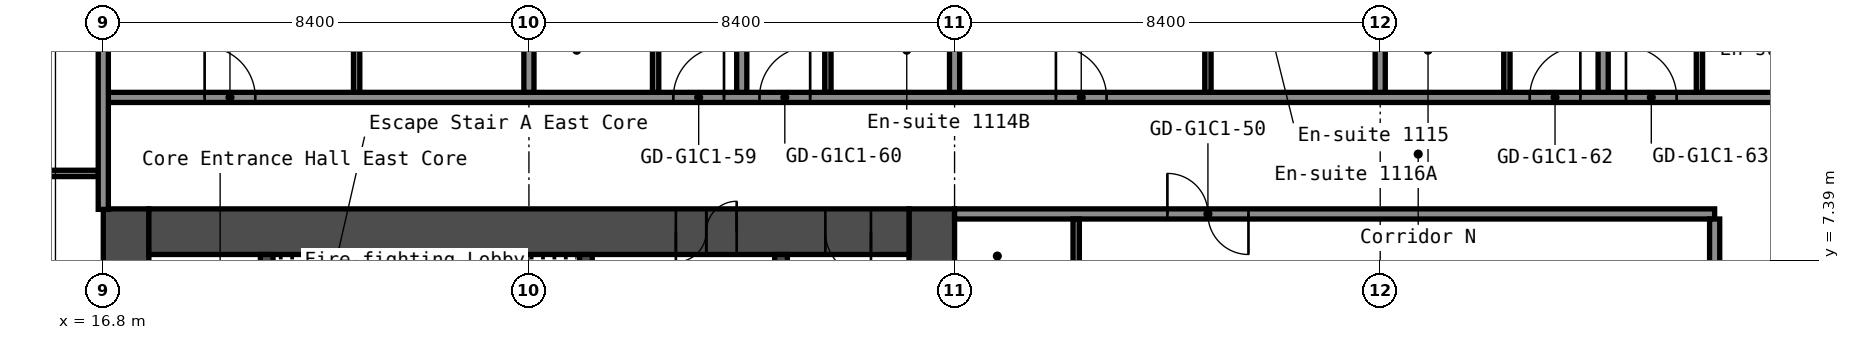
"""IFC4 building model, lengths in metres.
Left out: names, types, materials, properties, quantities, classifications, styles, units other than length and angle.
Written with IfcOpenShell. Run it as: python <this file> out.ifc"""

import sys

from ifc_helpers import new_model, si_unit, direction, frame, frame_2d, origin, place, context, subcontext, project, spatial, rectangle, extrude, element, fill, save


model = new_model("IFC4")
c1 = context("Model", 3, precision=1e-05, world=origin(), true_north=direction((0.0, 1.0)))
c2 = subcontext(c1, "Body", "Model", "MODEL_VIEW")
j1 = project(units=[si_unit("LENGTHUNIT", "METRE"), si_unit("PLANEANGLEUNIT", "RADIAN")], contexts=[c1])
p1 = place(None, origin())
s1 = spatial("IfcSite", under=j1, at=p1, CompositionType="ELEMENT")
p2 = place(p1, origin())
s2 = spatial("IfcBuilding", under=s1, at=p2, CompositionType="ELEMENT")
p3 = place(p2, frame((0.0, 0.0, 42.2)))
s3 = spatial("IfcBuildingStorey", under=s2, at=p3, CompositionType="ELEMENT", Elevation=42.2)
p4 = place(p3, frame((17.25, -8.4, 0.0), z_axis=(0.0, 0.0, 1.0), x_axis=(0.0, 1.0, 0.0)))
e1 = element("IfcWall", 1, at=p4, inside=s3, PredefinedType="SHEAR", context=c2, shape_type="SweptSolid", body=[
    extrude(rectangle(XDim=16.8, YDim=0.9, at=frame_2d((8.4, 0.0))), origin(), (0.0, 0.0, 1.0), 2.8),
])
p5 = place(p4, frame((12.75, 0.0, 0.0)))
e2 = element("IfcOpeningElement", 2, at=p5, cuts=e1, PredefinedType="OPENING", context=c2, shape_type="SweptSolid", body=[
    extrude(rectangle(XDim=1.2, YDim=2.1, at=frame_2d((0.6, 1.05))), frame((0.0, 0.46, 0.0), z_axis=(0.0, -1.0, 0.0), x_axis=(1.0, 0.0, 0.0)), (0.0, 0.0, 1.0), 0.92),
])
p6 = place(p4, frame((2.85, 0.0, 0.0)))
e3 = element("IfcOpeningElement", 3, at=p6, cuts=e1, PredefinedType="OPENING", context=c2, shape_type="SweptSolid", body=[
    extrude(rectangle(XDim=1.2, YDim=2.1, at=frame_2d((0.6, 1.05))), frame((0.0, 0.46, 0.0), z_axis=(0.0, -1.0, 0.0), x_axis=(1.0, 0.0, 0.0)), (0.0, 0.0, 1.0), 0.92),
])
p7 = place(p3, frame((33.15, -8.4, 0.0), z_axis=(0.0, 0.0, 1.0), x_axis=(0.0, 1.0, 0.0)))
e4 = element("IfcWall", 4, at=p7, inside=s3, PredefinedType="SHEAR", context=c2, shape_type="SweptSolid", body=[
    extrude(rectangle(XDim=16.8, YDim=0.9, at=frame_2d((8.4, 0.0))), origin(), (0.0, 0.0, 1.0), 2.8),
])
p8 = place(p3, frame((17.7, 7.95, 0.0), z_axis=(0.0, 0.0, 1.0), x_axis=(1.0, 0.0, 0.0)))
e5 = element("IfcWall", 5, at=p8, inside=s3, PredefinedType="SHEAR", context=c2, shape_type="SweptSolid", body=[
    extrude(rectangle(XDim=15.0, YDim=0.9, at=frame_2d((7.5, 0.0))), origin(), (0.0, 0.0, 1.0), 2.8),
])
p9 = place(p8, frame((10.4, 0.0, 0.0)))
e6 = element("IfcOpeningElement", 6, at=p9, cuts=e5, PredefinedType="OPENING", context=c2, shape_type="SweptSolid", body=[
    extrude(rectangle(XDim=1.2, YDim=2.1, at=frame_2d((0.6, 1.05))), frame((0.0, 0.46, 0.0), z_axis=(0.0, -1.0, 0.0), x_axis=(1.0, 0.0, 0.0)), (0.0, 0.0, 1.0), 0.92),
])
p10 = place(p8, frame((13.35, 0.0, 0.0)))
e7 = element("IfcOpeningElement", 7, at=p10, cuts=e5, PredefinedType="OPENING", context=c2, shape_type="SweptSolid", body=[
    extrude(rectangle(XDim=0.9, YDim=2.1, at=frame_2d((0.45, 1.05))), frame((0.0, 0.46, 0.0), z_axis=(0.0, -1.0, 0.0), x_axis=(1.0, 0.0, 0.0)), (0.0, 0.0, 1.0), 0.92),
])
p11 = place(p3, frame((20.025, 1.2, 0.0), z_axis=(0.0, 0.0, 1.0), x_axis=(0.0, 1.0, 0.0)))
e8 = element("IfcWall", 8, at=p11, inside=s3, PredefinedType="SHEAR", context=c2, shape_type="SweptSolid", body=[
    extrude(rectangle(XDim=6.3, YDim=0.25, at=frame_2d((3.15, 0.0))), origin(), (0.0, 0.0, 1.0), 2.8),
])
p12 = place(p3, frame((26.325, 3.75, 0.0), z_axis=(0.0, 0.0, 1.0), x_axis=(0.0, 1.0, 0.0)))
e9 = element("IfcWall", 9, at=p12, inside=s3, PredefinedType="SHEAR", context=c2, shape_type="SweptSolid", body=[
    extrude(rectangle(XDim=3.75, YDim=0.25, at=frame_2d((1.875, 0.0))), origin(), (0.0, 0.0, 1.0), 2.8),
])
p13 = place(p12, frame((1.25, 0.0, 0.0)))
e10 = element("IfcOpeningElement", 10, at=p13, cuts=e9, PredefinedType="OPENING", context=c2, shape_type="SweptSolid", body=[
    extrude(rectangle(XDim=1.2, YDim=2.1, at=frame_2d((0.6, 1.05))), frame((0.0, 0.135, 0.0), z_axis=(0.0, -1.0, 0.0), x_axis=(1.0, 0.0, 0.0)), (0.0, 0.0, 1.0), 0.27),
])
p14 = place(p3, frame((30.175, 1.45, 0.0), z_axis=(0.0, 0.0, 1.0), x_axis=(0.0, 1.0, 0.0)))
e11 = element("IfcWall", 11, at=p14, inside=s3, PredefinedType="SHEAR", context=c2, shape_type="SweptSolid", body=[
    extrude(rectangle(XDim=6.05, YDim=0.25, at=frame_2d((3.025, 0.0))), origin(), (0.0, 0.0, 1.0), 2.8),
])
p15 = place(p14, frame((2.625, 0.0, 0.0)))
e12 = element("IfcOpeningElement", 12, at=p15, cuts=e11, PredefinedType="OPENING", context=c2, shape_type="SweptSolid", body=[
    extrude(rectangle(XDim=1.1, YDim=2.1, at=frame_2d((0.55, 1.05))), frame((0.0, 0.135, 0.0), z_axis=(0.0, -1.0, 0.0), x_axis=(1.0, 0.0, 0.0)), (0.0, 0.0, 1.0), 0.27),
])
p16 = place(p3, frame((33.6, 8.3, 0.0), z_axis=(0.0, 0.0, 1.0), x_axis=(1.0, 0.0, 0.0)))
e13 = element("IfcWall", 13, at=p16, inside=s3, PredefinedType="PARTITIONING", context=c2, shape_type="SweptSolid", body=[
    extrude(rectangle(XDim=15.0, YDim=0.2, at=frame_2d((7.5, 0.0))), origin(), (0.0, 0.0, 1.0), 2.8),
])
p17 = place(p16, frame((4.2, 0.0, 0.0)))
e14 = element("IfcOpeningElement", 14, at=p17, cuts=e13, PredefinedType="OPENING", context=c2, shape_type="SweptSolid", body=[
    extrude(rectangle(XDim=1.6, YDim=2.1, at=frame_2d((0.8, 1.05))), frame((0.0, 0.11, 0.0), z_axis=(0.0, -1.0, 0.0), x_axis=(1.0, 0.0, 0.0)), (0.0, 0.0, 1.0), 0.22),
])
p18 = place(p3, frame((14.363, 9.1, 0.0), z_axis=(0.0, 0.0, 1.0), x_axis=(1.0, 0.0, 0.0)))
e15 = element("IfcWall", 15, at=p18, inside=s3, PredefinedType="PARTITIONING", context=c2, shape_type="SweptSolid", body=[
    extrude(rectangle(XDim=2.337, YDim=0.125, at=frame_2d((1.169, 0.0))), origin(), (0.0, 0.0, 1.0), 2.8),
])
p19 = place(p3, frame((16.8, 10.6, 0.0), z_axis=(0.0, 0.0, 1.0), x_axis=(1.0, 0.0, 0.0)))
e16 = element("IfcWall", 16, at=p19, inside=s3, PredefinedType="PARTITIONING", context=c2, shape_type="SweptSolid", body=[
    extrude(rectangle(XDim=34.3, YDim=0.2, at=frame_2d((17.15, 0.0))), origin(), (0.0, 0.0, 1.0), 2.8),
])
p20 = place(p19, frame((2.0, 0.0, 0.0)))
e17 = element("IfcOpeningElement", 17, at=p20, cuts=e16, PredefinedType="OPENING", context=c2, shape_type="SweptSolid", body=[
    extrude(rectangle(XDim=1.0, YDim=2.1, at=frame_2d((0.5, 1.05))), frame((0.0, 0.11, 0.0), z_axis=(0.0, -1.0, 0.0), x_axis=(1.0, 0.0, 0.0)), (0.0, 0.0, 1.0), 0.22),
])
p21 = place(p19, frame((11.25, 0.0, 0.0)))
e18 = element("IfcOpeningElement", 18, at=p21, cuts=e16, PredefinedType="OPENING", context=c2, shape_type="SweptSolid", body=[
    extrude(rectangle(XDim=1.0, YDim=2.1, at=frame_2d((0.5, 1.05))), frame((0.0, 0.11, 0.0), z_axis=(0.0, -1.0, 0.0), x_axis=(1.0, 0.0, 0.0)), (0.0, 0.0, 1.0), 0.22),
])
p22 = place(p19, frame((12.95, 0.0, 0.0)))
e19 = element("IfcOpeningElement", 19, at=p22, cuts=e16, PredefinedType="OPENING", context=c2, shape_type="SweptSolid", body=[
    extrude(rectangle(XDim=1.0, YDim=2.1, at=frame_2d((0.5, 1.05))), frame((0.0, 0.11, 0.0), z_axis=(0.0, -1.0, 0.0), x_axis=(1.0, 0.0, 0.0)), (0.0, 0.0, 1.0), 0.22),
])
p23 = place(p19, frame((18.8, 0.0, 0.0)))
e20 = element("IfcOpeningElement", 20, at=p23, cuts=e16, PredefinedType="OPENING", context=c2, shape_type="SweptSolid", body=[
    extrude(rectangle(XDim=1.0, YDim=2.1, at=frame_2d((0.5, 1.05))), frame((0.0, 0.11, 0.0), z_axis=(0.0, -1.0, 0.0), x_axis=(1.0, 0.0, 0.0)), (0.0, 0.0, 1.0), 0.22),
])
p24 = place(p19, frame((28.15, 0.0, 0.0)))
e21 = element("IfcOpeningElement", 21, at=p24, cuts=e16, PredefinedType="OPENING", context=c2, shape_type="SweptSolid", body=[
    extrude(rectangle(XDim=1.0, YDim=2.1, at=frame_2d((0.5, 1.05))), frame((0.0, 0.11, 0.0), z_axis=(0.0, -1.0, 0.0), x_axis=(1.0, 0.0, 0.0)), (0.0, 0.0, 1.0), 0.22),
])
p25 = place(p19, frame((30.05, 0.0, 0.0)))
e22 = element("IfcOpeningElement", 22, at=p25, cuts=e16, PredefinedType="OPENING", context=c2, shape_type="SweptSolid", body=[
    extrude(rectangle(XDim=1.0, YDim=2.1, at=frame_2d((0.5, 1.05))), frame((0.0, 0.11, 0.0), z_axis=(0.0, -1.0, 0.0), x_axis=(1.0, 0.0, 0.0)), (0.0, 0.0, 1.0), 0.22),
])
p26 = place(p3, frame((16.8, 8.39, 0.0), z_axis=(0.0, 0.0, 1.0), x_axis=(0.0, 1.0, 0.0)))
e23 = element("IfcWall", 23, at=p26, inside=s3, PredefinedType="PARTITIONING", context=c2, shape_type="SweptSolid", body=[
    extrude(rectangle(XDim=11.91, YDim=0.2, at=frame_2d((5.955, 0.0))), origin(), (0.0, 0.0, 1.0), 2.8),
])
p27 = place(p3, frame((21.8, 10.7, 0.0), z_axis=(0.0, 0.0, 1.0), x_axis=(0.0, 1.0, 0.0)))
e24 = element("IfcWall", 24, at=p27, inside=s3, PredefinedType="PARTITIONING", context=c2, shape_type="SweptSolid", body=[
    extrude(rectangle(XDim=3.3, YDim=0.125, at=frame_2d((1.65, 0.0))), origin(), (0.0, 0.0, 1.0), 2.8),
])
p28 = place(p3, frame((25.2, 10.7, 0.0), z_axis=(0.0, 0.0, 1.0), x_axis=(0.0, 1.0, 0.0)))
e25 = element("IfcWall", 25, at=p28, inside=s3, PredefinedType="PARTITIONING", context=c2, shape_type="SweptSolid", body=[
    extrude(rectangle(XDim=9.6, YDim=0.2, at=frame_2d((4.8, 0.0))), origin(), (0.0, 0.0, 1.0), 2.8),
])
p29 = place(p3, frame((27.7, 10.7, 0.0), z_axis=(0.0, 0.0, 1.0), x_axis=(0.0, 1.0, 0.0)))
e26 = element("IfcWall", 26, at=p29, inside=s3, PredefinedType="PARTITIONING", context=c2, shape_type="SweptSolid", body=[
    extrude(rectangle(XDim=2.9, YDim=0.125, at=frame_2d((1.45, 0.0))), origin(), (0.0, 0.0, 1.0), 2.8),
])
p30 = place(p29, frame((1.5, 0.0, 0.0)))
e27 = element("IfcOpeningElement", 27, at=p30, cuts=e26, PredefinedType="OPENING", context=c2, shape_type="SweptSolid", body=[
    extrude(rectangle(XDim=0.8, YDim=2.1, at=frame_2d((0.4, 1.05))), frame((0.0, 0.073, 0.0), z_axis=(0.0, -1.0, 0.0), x_axis=(1.0, 0.0, 0.0)), (0.0, 0.0, 1.0), 0.145),
])
p31 = place(p3, frame((29.4, 10.7, 0.0), z_axis=(0.0, 0.0, 1.0), x_axis=(0.0, 1.0, 0.0)))
e28 = element("IfcWall", 28, at=p31, inside=s3, PredefinedType="PARTITIONING", context=c2, shape_type="SweptSolid", body=[
    extrude(rectangle(XDim=9.6, YDim=0.2, at=frame_2d((4.8, 0.0))), origin(), (0.0, 0.0, 1.0), 2.8),
])
p32 = place(p3, frame((31.1, 10.7, 0.0), z_axis=(0.0, 0.0, 1.0), x_axis=(0.0, 1.0, 0.0)))
e29 = element("IfcWall", 29, at=p32, inside=s3, PredefinedType="PARTITIONING", context=c2, shape_type="SweptSolid", body=[
    extrude(rectangle(XDim=2.9, YDim=0.125, at=frame_2d((1.45, 0.0))), origin(), (0.0, 0.0, 1.0), 2.8),
])
p33 = place(p32, frame((1.5, 0.0, 0.0)))
e30 = element("IfcOpeningElement", 30, at=p33, cuts=e29, PredefinedType="OPENING", context=c2, shape_type="SweptSolid", body=[
    extrude(rectangle(XDim=0.8, YDim=2.1, at=frame_2d((0.4, 1.05))), frame((0.0, 0.073, 0.0), z_axis=(0.0, -1.0, 0.0), x_axis=(1.0, 0.0, 0.0)), (0.0, 0.0, 1.0), 0.145),
])
p34 = place(p3, frame((33.6, 10.7, 0.0), z_axis=(0.0, 0.0, 1.0), x_axis=(0.0, 1.0, 0.0)))
e31 = element("IfcWall", 31, at=p34, inside=s3, PredefinedType="PARTITIONING", context=c2, shape_type="SweptSolid", body=[
    extrude(rectangle(XDim=9.6, YDim=0.2, at=frame_2d((4.8, 0.0))), origin(), (0.0, 0.0, 1.0), 2.8),
])
p35 = place(p3, frame((36.0, 5.7, 0.0), z_axis=(0.0, 0.0, 1.0), x_axis=(0.0, 1.0, 0.0)))
e32 = element("IfcWall", 32, at=p35, inside=s3, PredefinedType="PARTITIONING", context=c2, shape_type="SweptSolid", body=[
    extrude(rectangle(XDim=2.5, YDim=0.125, at=frame_2d((1.25, 0.0))), origin(), (0.0, 0.0, 1.0), 2.8),
])
p36 = place(p35, frame((0.55, 0.0, 0.0)))
e33 = element("IfcOpeningElement", 33, at=p36, cuts=e32, PredefinedType="OPENING", context=c2, shape_type="SweptSolid", body=[
    extrude(rectangle(XDim=0.9, YDim=2.1, at=frame_2d((0.45, 1.05))), frame((0.0, 0.073, 0.0), z_axis=(0.0, -1.0, 0.0), x_axis=(1.0, 0.0, 0.0)), (0.0, 0.0, 1.0), 0.145),
])
p37 = place(p3, frame((38.6, 10.7, 0.0), z_axis=(0.0, 0.0, 1.0), x_axis=(0.0, 1.0, 0.0)))
e34 = element("IfcWall", 34, at=p37, inside=s3, PredefinedType="PARTITIONING", context=c2, shape_type="SweptSolid", body=[
    extrude(rectangle(XDim=3.3, YDim=0.125, at=frame_2d((1.65, 0.0))), origin(), (0.0, 0.0, 1.0), 2.8),
])
p38 = place(p3, frame((42.0, 10.7, 0.0), z_axis=(0.0, 0.0, 1.0), x_axis=(0.0, 1.0, 0.0)))
e35 = element("IfcWall", 35, at=p38, inside=s3, PredefinedType="PARTITIONING", context=c2, shape_type="SweptSolid", body=[
    extrude(rectangle(XDim=9.6, YDim=0.2, at=frame_2d((4.8, 0.0))), origin(), (0.0, 0.0, 1.0), 2.8),
])
p39 = place(p3, frame((44.5, 10.7, 0.0), z_axis=(0.0, 0.0, 1.0), x_axis=(0.0, 1.0, 0.0)))
e36 = element("IfcWall", 36, at=p39, inside=s3, PredefinedType="PARTITIONING", context=c2, shape_type="SweptSolid", body=[
    extrude(rectangle(XDim=2.9, YDim=0.125, at=frame_2d((1.45, 0.0))), origin(), (0.0, 0.0, 1.0), 2.8),
])
p40 = place(p39, frame((1.5, 0.0, 0.0)))
e37 = element("IfcOpeningElement", 37, at=p40, cuts=e36, PredefinedType="OPENING", context=c2, shape_type="SweptSolid", body=[
    extrude(rectangle(XDim=0.8, YDim=2.1, at=frame_2d((0.4, 1.05))), frame((0.0, 0.073, 0.0), z_axis=(0.0, -1.0, 0.0), x_axis=(1.0, 0.0, 0.0)), (0.0, 0.0, 1.0), 0.145),
])
p41 = place(p3, frame((46.4, 10.7, 0.0), z_axis=(0.0, 0.0, 1.0), x_axis=(0.0, 1.0, 0.0)))
e38 = element("IfcWall", 38, at=p41, inside=s3, PredefinedType="PARTITIONING", context=c2, shape_type="SweptSolid", body=[
    extrude(rectangle(XDim=9.6, YDim=0.2, at=frame_2d((4.8, 0.0))), origin(), (0.0, 0.0, 1.0), 2.8),
])
p42 = place(p3, frame((48.3, 10.7, 0.0), z_axis=(0.0, 0.0, 1.0), x_axis=(0.0, 1.0, 0.0)))
e39 = element("IfcWall", 39, at=p42, inside=s3, PredefinedType="PARTITIONING", context=c2, shape_type="SweptSolid", body=[
    extrude(rectangle(XDim=2.9, YDim=0.125, at=frame_2d((1.45, 0.0))), origin(), (0.0, 0.0, 1.0), 2.8),
])
p43 = place(p42, frame((1.5, 0.0, 0.0)))
e40 = element("IfcOpeningElement", 40, at=p43, cuts=e39, PredefinedType="OPENING", context=c2, shape_type="SweptSolid", body=[
    extrude(rectangle(XDim=0.8, YDim=2.1, at=frame_2d((0.4, 1.05))), frame((0.0, 0.073, 0.0), z_axis=(0.0, -1.0, 0.0), x_axis=(1.0, 0.0, 0.0)), (0.0, 0.0, 1.0), 0.145),
])
p44 = place(p3, frame((48.6, -8.2, 0.0), z_axis=(0.0, 0.0, 1.0), x_axis=(0.0, 1.0, 0.0)))
e41 = element("IfcWall", 41, at=p44, inside=s3, PredefinedType="PARTITIONING", context=c2, shape_type="SweptSolid", body=[
    extrude(rectangle(XDim=16.4, YDim=0.2, at=frame_2d((8.2, 0.0))), origin(), (0.0, 0.0, 1.0), 2.8),
])
p45 = place(p9, origin())
e42 = element("IfcDoor", 42, at=p45, inside=s3, OperationType="DOUBLE_DOOR_SINGLE_SWING", PredefinedType="DOOR", context=c2, shape_type="SweptSolid", body=[
    extrude(rectangle(XDim=1.2, YDim=2.1, at=frame_2d((0.6, 1.05))), frame((0.0, 0.025, 0.0), z_axis=(0.0, -1.0, 0.0), x_axis=(1.0, 0.0, 0.0)), (0.0, 0.0, 1.0), 0.05),
])
fill(e6, e42)
p46 = place(p10, origin())
e43 = element("IfcDoor", 43, at=p46, inside=s3, OperationType="SINGLE_SWING_RIGHT", PredefinedType="DOOR", context=c2, shape_type="SweptSolid", body=[
    extrude(rectangle(XDim=0.9, YDim=2.1, at=frame_2d((0.45, 1.05))), frame((0.0, 0.025, 0.0), z_axis=(0.0, -1.0, 0.0), x_axis=(1.0, 0.0, 0.0)), (0.0, 0.0, 1.0), 0.05),
])
fill(e7, e43)
p47 = place(p17, origin())
e44 = element("IfcDoor", 44, at=p47, inside=s3, OperationType="DOUBLE_DOOR_SINGLE_SWING", PredefinedType="DOOR", context=c2, shape_type="SweptSolid", body=[
    extrude(rectangle(XDim=1.6, YDim=2.1, at=frame_2d((0.8, 1.05))), frame((0.0, 0.025, 0.0), z_axis=(0.0, -1.0, 0.0), x_axis=(1.0, 0.0, 0.0)), (0.0, 0.0, 1.0), 0.05),
])
fill(e14, e44)
p48 = place(p20, origin())
e45 = element("IfcDoor", 45, at=p48, inside=s3, OperationType="SINGLE_SWING_RIGHT", PredefinedType="DOOR", context=c2, shape_type="SweptSolid", body=[
    extrude(rectangle(XDim=1.0, YDim=2.1, at=frame_2d((0.5, 1.05))), frame((0.0, 0.025, 0.0), z_axis=(0.0, -1.0, 0.0), x_axis=(1.0, 0.0, 0.0)), (0.0, 0.0, 1.0), 0.05),
])
fill(e17, e45)
p49 = place(p21, origin())
e46 = element("IfcDoor", 46, at=p49, inside=s3, OperationType="SINGLE_SWING_LEFT", PredefinedType="DOOR", context=c2, shape_type="SweptSolid", body=[
    extrude(rectangle(XDim=1.0, YDim=2.1, at=frame_2d((0.5, 1.05))), frame((0.0, 0.025, 0.0), z_axis=(0.0, -1.0, 0.0), x_axis=(1.0, 0.0, 0.0)), (0.0, 0.0, 1.0), 0.05),
])
fill(e18, e46)
p50 = place(p22, origin())
e47 = element("IfcDoor", 47, at=p50, inside=s3, OperationType="SINGLE_SWING_LEFT", PredefinedType="DOOR", context=c2, shape_type="SweptSolid", body=[
    extrude(rectangle(XDim=1.0, YDim=2.1, at=frame_2d((0.5, 1.05))), frame((0.0, 0.025, 0.0), z_axis=(0.0, -1.0, 0.0), x_axis=(1.0, 0.0, 0.0)), (0.0, 0.0, 1.0), 0.05),
])
fill(e19, e47)
p51 = place(p23, origin())
e48 = element("IfcDoor", 48, at=p51, inside=s3, OperationType="SINGLE_SWING_RIGHT", PredefinedType="DOOR", context=c2, shape_type="SweptSolid", body=[
    extrude(rectangle(XDim=1.0, YDim=2.1, at=frame_2d((0.5, 1.05))), frame((0.0, 0.025, 0.0), z_axis=(0.0, -1.0, 0.0), x_axis=(1.0, 0.0, 0.0)), (0.0, 0.0, 1.0), 0.05),
])
fill(e20, e48)
p52 = place(p24, origin())
e49 = element("IfcDoor", 49, at=p52, inside=s3, OperationType="SINGLE_SWING_LEFT", PredefinedType="DOOR", context=c2, shape_type="SweptSolid", body=[
    extrude(rectangle(XDim=1.0, YDim=2.1, at=frame_2d((0.5, 1.05))), frame((0.0, 0.025, 0.0), z_axis=(0.0, -1.0, 0.0), x_axis=(1.0, 0.0, 0.0)), (0.0, 0.0, 1.0), 0.05),
])
fill(e21, e49)
p53 = place(p25, origin())
e50 = element("IfcDoor", 50, at=p53, inside=s3, OperationType="SINGLE_SWING_RIGHT", PredefinedType="DOOR", context=c2, shape_type="SweptSolid", body=[
    extrude(rectangle(XDim=1.0, YDim=2.1, at=frame_2d((0.5, 1.05))), frame((0.0, 0.025, 0.0), z_axis=(0.0, -1.0, 0.0), x_axis=(1.0, 0.0, 0.0)), (0.0, 0.0, 1.0), 0.05),
])
fill(e22, e50)
save(model, sys.argv[1])
